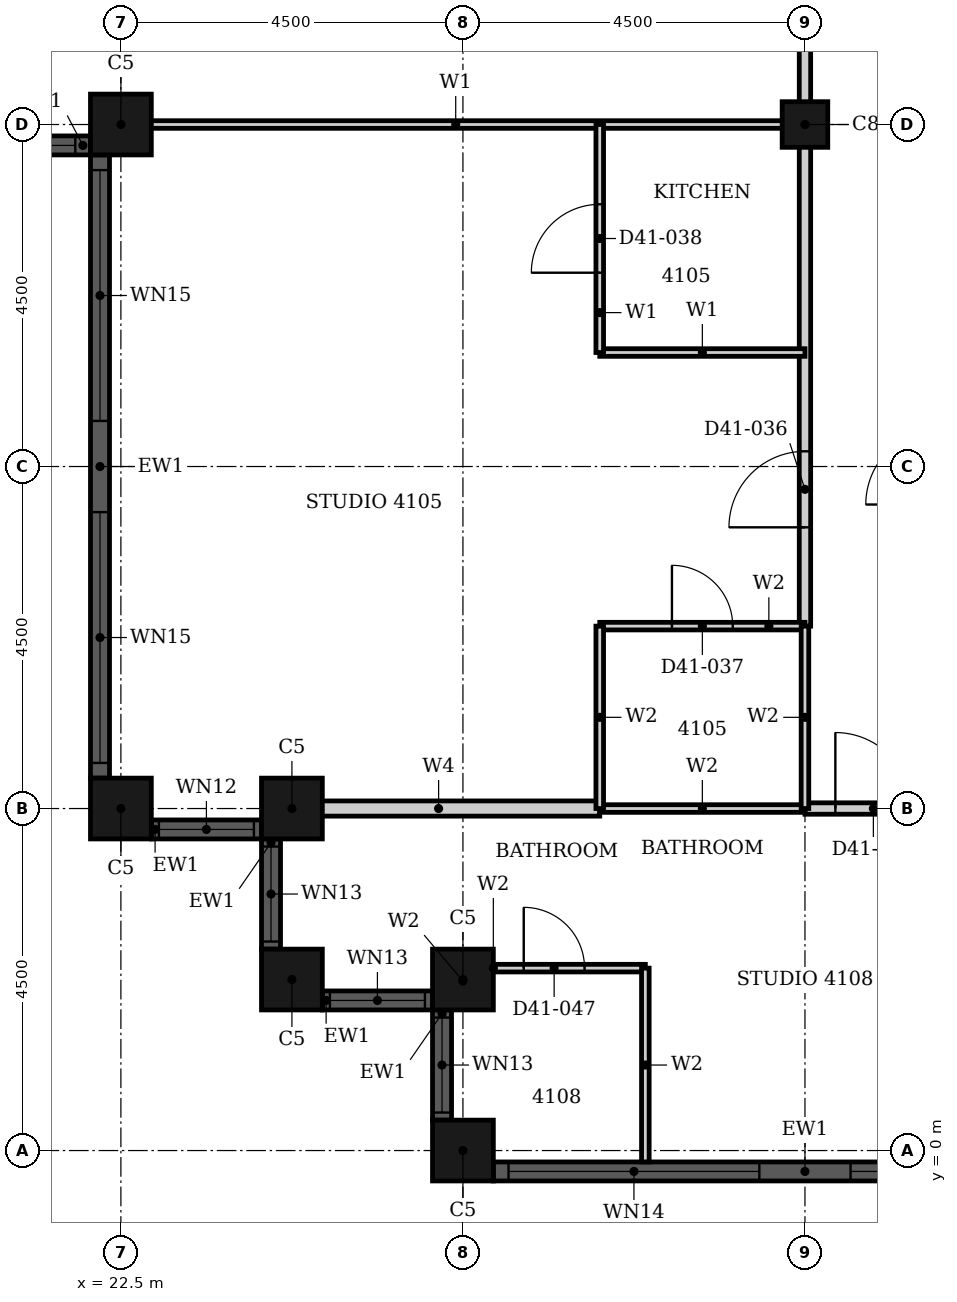
"""IFC4 building model, lengths in metres.
Left out: names, types, materials, properties, quantities, classifications, styles, units other than length and angle.
Written with IfcOpenShell. Run it as: python <this file> out.ifc"""

import sys

from ifc_helpers import new_model, si_unit, direction, frame, frame_2d, origin, origin_2d, place, context, subcontext, project, spatial, rectangle, hollow_rectangle, extrude, element, fill, save


model = new_model("IFC4")
c1 = context("Model", 3, precision=1e-05, world=origin(), true_north=direction((0.0, 1.0)))
c2 = subcontext(c1, "Body", "Model", "MODEL_VIEW")
j1 = project(units=[si_unit("LENGTHUNIT", "METRE"), si_unit("PLANEANGLEUNIT", "RADIAN")], contexts=[c1])
p1 = place(None, origin())
s1 = spatial("IfcSite", under=j1, at=p1, CompositionType="ELEMENT")
p2 = place(p1, origin())
s2 = spatial("IfcBuilding", under=s1, at=p2, CompositionType="ELEMENT")
p3 = place(p2, frame((0.0, 0.0, 165.4)))
s3 = spatial("IfcBuildingStorey", under=s2, at=p3, CompositionType="ELEMENT", Elevation=165.4)
for number, where, z_axis, x_axis in (
    (1, (22.5, 4.5, 0.0), (0.0, 0.0, 1.0), (1.0, 0.0, 0.0)),
    (2, (24.75, 4.5, 0.0), (0.0, 0.0, 1.0), (1.0, 0.0, 0.0)),
    (3, (24.75, 2.25, 0.0), (0.0, 0.0, 1.0), (1.0, 0.0, 0.0)),
    (4, (27.0, 2.25, 0.0), (0.0, 0.0, 1.0), (1.0, 0.0, 0.0)),
    (5, (27.0, 0.0, 0.0), (0.0, 0.0, 1.0), (1.0, 0.0, 0.0)),
    (6, (22.5, 13.5, 0.0), (0.0, 0.0, 1.0), (1.0, 0.0, 0.0)),
):
    element("IfcColumn", number, at=place(p3, frame(where, z_axis=z_axis, x_axis=x_axis)), inside=s3, PredefinedType="COLUMN", context=c2, shape_type="SweptSolid", body=[
        extrude(hollow_rectangle(XDim=0.8, YDim=0.8, WallThickness=0.025, at=origin_2d()), origin(), (0.0, 0.0, 1.0), 3.7),
    ])
p4 = place(p3, frame((31.5, 13.5, 0.0), z_axis=(0.0, 0.0, 1.0), x_axis=(1.0, 0.0, 0.0)))
e7 = element("IfcColumn", 7, at=p4, inside=s3, PredefinedType="COLUMN", context=c2, shape_type="SweptSolid", body=[
    extrude(hollow_rectangle(XDim=0.6, YDim=0.6, WallThickness=0.02, at=origin_2d()), origin(), (0.0, 0.0, 1.0), 3.7),
])
p5 = place(p3, frame((22.9, 4.225, 0.0), z_axis=(0.0, 0.0, 1.0), x_axis=(1.0, 0.0, 0.0)))
e8 = element("IfcWall", 8, at=p5, inside=s3, PredefinedType="SOLIDWALL", context=c2, shape_type="SweptSolid", body=[
    extrude(rectangle(XDim=1.45, YDim=0.25, at=frame_2d((0.725, 0.0))), origin(), (0.0, 0.0, 1.0), 3.7),
])
p6 = place(p5, frame((0.1, 0.0, 0.9)))
e9 = element("IfcOpeningElement", 9, at=p6, cuts=e8, PredefinedType="OPENING", context=c2, shape_type="SweptSolid", body=[
    extrude(rectangle(XDim=1.25, YDim=2.08, at=frame_2d((0.625, 1.04))), frame((0.0, 0.135, 0.0), z_axis=(0.0, -1.0, 0.0), x_axis=(1.0, 0.0, 0.0)), (0.0, 0.0, 1.0), 0.27),
])
p7 = place(p3, frame((24.475, 4.1, 0.0), z_axis=(0.0, 0.0, 1.0), x_axis=(0.0, -1.0, 0.0)))
e10 = element("IfcWall", 10, at=p7, inside=s3, PredefinedType="SOLIDWALL", context=c2, shape_type="SweptSolid", body=[
    extrude(rectangle(XDim=1.45, YDim=0.25, at=frame_2d((0.725, 0.0))), origin(), (0.0, 0.0, 1.0), 3.7),
])
p8 = place(p7, frame((0.1, 0.0, 0.9)))
e11 = element("IfcOpeningElement", 11, at=p8, cuts=e10, PredefinedType="OPENING", context=c2, shape_type="SweptSolid", body=[
    extrude(rectangle(XDim=1.25, YDim=1.85, at=frame_2d((0.625, 0.925))), frame((0.0, 0.135, 0.0), z_axis=(0.0, -1.0, 0.0), x_axis=(1.0, 0.0, 0.0)), (0.0, 0.0, 1.0), 0.27),
])
p9 = place(p3, frame((25.15, 1.975, 0.0), z_axis=(0.0, 0.0, 1.0), x_axis=(1.0, 0.0, 0.0)))
e12 = element("IfcWall", 12, at=p9, inside=s3, PredefinedType="SOLIDWALL", context=c2, shape_type="SweptSolid", body=[
    extrude(rectangle(XDim=1.45, YDim=0.25, at=frame_2d((0.725, 0.0))), origin(), (0.0, 0.0, 1.0), 3.7),
])
p10 = place(p9, frame((0.1, 0.0, 0.9)))
e13 = element("IfcOpeningElement", 13, at=p10, cuts=e12, PredefinedType="OPENING", context=c2, shape_type="SweptSolid", body=[
    extrude(rectangle(XDim=1.25, YDim=1.85, at=frame_2d((0.625, 0.925))), frame((0.0, 0.135, 0.0), z_axis=(0.0, -1.0, 0.0), x_axis=(1.0, 0.0, 0.0)), (0.0, 0.0, 1.0), 0.27),
])
p11 = place(p3, frame((26.725, 1.85, 0.0), z_axis=(0.0, 0.0, 1.0), x_axis=(0.0, -1.0, 0.0)))
e14 = element("IfcWall", 14, at=p11, inside=s3, PredefinedType="SOLIDWALL", context=c2, shape_type="SweptSolid", body=[
    extrude(rectangle(XDim=1.45, YDim=0.25, at=frame_2d((0.725, 0.0))), origin(), (0.0, 0.0, 1.0), 3.7),
])
p12 = place(p11, frame((0.1, 0.0, 0.9)))
e15 = element("IfcOpeningElement", 15, at=p12, cuts=e14, PredefinedType="OPENING", context=c2, shape_type="SweptSolid", body=[
    extrude(rectangle(XDim=1.25, YDim=1.85, at=frame_2d((0.625, 0.925))), frame((0.0, 0.135, 0.0), z_axis=(0.0, -1.0, 0.0), x_axis=(1.0, 0.0, 0.0)), (0.0, 0.0, 1.0), 0.27),
])
p13 = place(p3, frame((27.4, -0.275, 0.0), z_axis=(0.0, 0.0, 1.0), x_axis=(1.0, 0.0, 0.0)))
e16 = element("IfcWall", 16, at=p13, inside=s3, PredefinedType="SOLIDWALL", context=c2, shape_type="SweptSolid", body=[
    extrude(rectangle(XDim=8.2, YDim=0.25, at=frame_2d((4.1, 0.0))), origin(), (0.0, 0.0, 1.0), 3.7),
])
p14 = place(p13, frame((0.2, 0.0, 0.45)))
e17 = element("IfcOpeningElement", 17, at=p14, cuts=e16, PredefinedType="OPENING", context=c2, shape_type="SweptSolid", body=[
    extrude(rectangle(XDim=3.3, YDim=2.53, at=frame_2d((1.65, 1.265))), frame((0.0, 0.135, 0.0), z_axis=(0.0, -1.0, 0.0), x_axis=(1.0, 0.0, 0.0)), (0.0, 0.0, 1.0), 0.27),
])
p15 = place(p13, frame((4.7, 0.0, 0.45)))
e18 = element("IfcOpeningElement", 18, at=p15, cuts=e16, PredefinedType="OPENING", context=c2, shape_type="SweptSolid", body=[
    extrude(rectangle(XDim=3.3, YDim=2.53, at=frame_2d((1.65, 1.265))), frame((0.0, 0.135, 0.0), z_axis=(0.0, -1.0, 0.0), x_axis=(1.0, 0.0, 0.0)), (0.0, 0.0, 1.0), 0.27),
])
p16 = place(p3, frame((18.4, 13.225, 0.0), z_axis=(0.0, 0.0, 1.0), x_axis=(1.0, 0.0, 0.0)))
e19 = element("IfcWall", 19, at=p16, inside=s3, PredefinedType="SOLIDWALL", context=c2, shape_type="SweptSolid", body=[
    extrude(rectangle(XDim=3.7, YDim=0.25, at=frame_2d((1.85, 0.0))), origin(), (0.0, 0.0, 1.0), 3.7),
])
p17 = place(p16, frame((0.2, 0.0, 0.45)))
e20 = element("IfcOpeningElement", 20, at=p17, cuts=e19, PredefinedType="OPENING", context=c2, shape_type="SweptSolid", body=[
    extrude(rectangle(XDim=3.3, YDim=2.3, at=frame_2d((1.65, 1.15))), frame((0.0, 0.135, 0.0), z_axis=(0.0, -1.0, 0.0), x_axis=(1.0, 0.0, 0.0)), (0.0, 0.0, 1.0), 0.27),
])
p18 = place(p3, frame((22.225, 13.1, 0.0), z_axis=(0.0, 0.0, 1.0), x_axis=(0.0, -1.0, 0.0)))
e21 = element("IfcWall", 21, at=p18, inside=s3, PredefinedType="SOLIDWALL", context=c2, shape_type="SweptSolid", body=[
    extrude(rectangle(XDim=8.2, YDim=0.25, at=frame_2d((4.1, 0.0))), origin(), (0.0, 0.0, 1.0), 3.7),
])
p19 = place(p18, frame((0.2, 0.0, 0.45)))
e22 = element("IfcOpeningElement", 22, at=p19, cuts=e21, PredefinedType="OPENING", context=c2, shape_type="SweptSolid", body=[
    extrude(rectangle(XDim=3.3, YDim=2.3, at=frame_2d((1.65, 1.15))), frame((0.0, 0.135, 0.0), z_axis=(0.0, -1.0, 0.0), x_axis=(1.0, 0.0, 0.0)), (0.0, 0.0, 1.0), 0.27),
])
p20 = place(p18, frame((4.7, 0.0, 0.45)))
e23 = element("IfcOpeningElement", 23, at=p20, cuts=e21, PredefinedType="OPENING", context=c2, shape_type="SweptSolid", body=[
    extrude(rectangle(XDim=3.3, YDim=2.3, at=frame_2d((1.65, 1.15))), frame((0.0, 0.135, 0.0), z_axis=(0.0, -1.0, 0.0), x_axis=(1.0, 0.0, 0.0)), (0.0, 0.0, 1.0), 0.27),
])
p21 = place(p3, frame((31.5, 4.5, 0.0), z_axis=(0.0, 0.0, 1.0), x_axis=(1.0, 0.0, 0.0)))
e24 = element("IfcWall", 24, at=p21, inside=s3, PredefinedType="PARTITIONING", context=c2, shape_type="SweptSolid", body=[
    extrude(rectangle(XDim=1.8, YDim=0.15, at=frame_2d((0.9, 0.0))), origin(), (0.0, 0.0, 1.0), 3.4),
])
p22 = place(p21, frame((0.4, 0.0, 0.0)))
e25 = element("IfcOpeningElement", 25, at=p22, cuts=e24, PredefinedType="OPENING", context=c2, shape_type="SweptSolid", body=[
    extrude(rectangle(XDim=1.0, YDim=2.2, at=frame_2d((0.5, 1.1))), frame((0.0, 0.085, 0.0), z_axis=(0.0, -1.0, 0.0), x_axis=(1.0, 0.0, 0.0)), (0.0, 0.0, 1.0), 0.17),
])
p23 = place(p3, frame((31.5, 6.9, 0.0), z_axis=(0.0, 0.0, 1.0), x_axis=(0.0, 1.0, 0.0)))
e26 = element("IfcWall", 26, at=p23, inside=s3, PredefinedType="PARTITIONING", context=c2, shape_type="SweptSolid", body=[
    extrude(rectangle(XDim=13.8, YDim=0.15, at=frame_2d((6.9, 0.0))), origin(), (0.0, 0.0, 1.0), 2.68),
])
p24 = place(p23, frame((1.3, 0.0, 0.0)))
e27 = element("IfcOpeningElement", 27, at=p24, cuts=e26, PredefinedType="OPENING", context=c2, shape_type="SweptSolid", body=[
    extrude(rectangle(XDim=1.0, YDim=2.2, at=frame_2d((0.5, 1.1))), frame((0.0, 0.085, 0.0), z_axis=(0.0, -1.0, 0.0), x_axis=(1.0, 0.0, 0.0)), (0.0, 0.0, 1.0), 0.17),
])
p25 = place(p3, frame((28.8, 10.5, 0.0), z_axis=(0.0, 0.0, 1.0), x_axis=(1.0, 0.0, 0.0)))
e28 = element("IfcWall", 28, at=p25, inside=s3, PredefinedType="PARTITIONING", context=c2, shape_type="SweptSolid", body=[
    extrude(rectangle(XDim=2.7, YDim=0.1, at=frame_2d((1.35, 0.0))), origin(), (0.0, 0.0, 1.0), 3.4),
])
p26 = place(p3, frame((22.31, 13.5, 0.0), z_axis=(0.0, 0.0, 1.0), x_axis=(1.0, 0.0, 0.0)))
e29 = element("IfcWall", 29, at=p26, inside=s3, PredefinedType="PARTITIONING", context=c2, shape_type="SweptSolid", body=[
    extrude(rectangle(XDim=9.19, YDim=0.1, at=frame_2d((4.595, 0.0))), origin(), (0.0, 0.0, 1.0), 2.48),
])
p27 = place(p3, frame((28.8, 10.5, 0.0), z_axis=(0.0, 0.0, 1.0), x_axis=(0.0, 1.0, 0.0)))
e30 = element("IfcWall", 30, at=p27, inside=s3, PredefinedType="PARTITIONING", context=c2, shape_type="SweptSolid", body=[
    extrude(rectangle(XDim=3.0, YDim=0.1, at=frame_2d((1.5, 0.0))), origin(), (0.0, 0.0, 1.0), 3.4),
])
p28 = place(p27, frame((1.05, 0.0, 0.0)))
e31 = element("IfcOpeningElement", 31, at=p28, cuts=e30, PredefinedType="OPENING", context=c2, shape_type="SweptSolid", body=[
    extrude(rectangle(XDim=0.9, YDim=2.1, at=frame_2d((0.45, 1.05))), frame((0.0, 0.06, 0.0), z_axis=(0.0, -1.0, 0.0), x_axis=(1.0, 0.0, 0.0)), (0.0, 0.0, 1.0), 0.12),
])
p29 = place(p3, frame((24.56, 4.5, 0.0), z_axis=(0.0, 0.0, 1.0), x_axis=(1.0, 0.0, 0.0)))
e32 = element("IfcWall", 32, at=p29, inside=s3, PredefinedType="PARTITIONING", context=c2, shape_type="SweptSolid", body=[
    extrude(rectangle(XDim=4.24, YDim=0.2, at=frame_2d((2.12, 0.0))), origin(), (0.0, 0.0, 1.0), 3.4),
])
p30 = place(p3, frame((27.0, 2.4, 0.0), z_axis=(0.0, 0.0, 1.0), x_axis=(1.0, 0.0, 0.0)))
e33 = element("IfcWall", 33, at=p30, inside=s3, PredefinedType="PARTITIONING", context=c2, shape_type="SweptSolid", body=[
    extrude(rectangle(XDim=2.4, YDim=0.1, at=frame_2d((1.2, 0.0))), origin(), (0.0, 0.0, 1.0), 3.4),
])
p31 = place(p30, frame((0.8, 0.0, 0.0)))
e34 = element("IfcOpeningElement", 34, at=p31, cuts=e33, PredefinedType="OPENING", context=c2, shape_type="SweptSolid", body=[
    extrude(rectangle(XDim=0.8, YDim=2.1, at=frame_2d((0.4, 1.05))), frame((0.0, 0.06, 0.0), z_axis=(0.0, -1.0, 0.0), x_axis=(1.0, 0.0, 0.0)), (0.0, 0.0, 1.0), 0.12),
])
p32 = place(p3, frame((28.8, 4.5, 0.0), z_axis=(0.0, 0.0, 1.0), x_axis=(1.0, 0.0, 0.0)))
e35 = element("IfcWall", 35, at=p32, inside=s3, PredefinedType="PARTITIONING", context=c2, shape_type="SweptSolid", body=[
    extrude(rectangle(XDim=2.7, YDim=0.1, at=frame_2d((1.35, 0.0))), origin(), (0.0, 0.0, 1.0), 3.4),
])
p33 = place(p3, frame((28.8, 6.9, 0.0), z_axis=(0.0, 0.0, 1.0), x_axis=(1.0, 0.0, 0.0)))
e36 = element("IfcWall", 36, at=p33, inside=s3, PredefinedType="PARTITIONING", context=c2, shape_type="SweptSolid", body=[
    extrude(rectangle(XDim=2.7, YDim=0.1, at=frame_2d((1.35, 0.0))), origin(), (0.0, 0.0, 1.0), 3.4),
])
p34 = place(p33, frame((0.95, 0.0, 0.0)))
e37 = element("IfcOpeningElement", 37, at=p34, cuts=e36, PredefinedType="OPENING", context=c2, shape_type="SweptSolid", body=[
    extrude(rectangle(XDim=0.8, YDim=2.1, at=frame_2d((0.4, 1.05))), frame((0.0, 0.06, 0.0), z_axis=(0.0, -1.0, 0.0), x_axis=(1.0, 0.0, 0.0)), (0.0, 0.0, 1.0), 0.12),
])
p35 = place(p3, frame((27.0, 2.06, 0.0), z_axis=(0.0, 0.0, 1.0), x_axis=(0.0, 1.0, 0.0)))
e38 = element("IfcWall", 38, at=p35, inside=s3, PredefinedType="PARTITIONING", context=c2, shape_type="SweptSolid", body=[
    extrude(rectangle(XDim=0.34, YDim=0.1, at=frame_2d((0.17, 0.0))), origin(), (0.0, 0.0, 1.0), 3.4),
])
p36 = place(p3, frame((28.8, 4.5, 0.0), z_axis=(0.0, 0.0, 1.0), x_axis=(0.0, 1.0, 0.0)))
e39 = element("IfcWall", 39, at=p36, inside=s3, PredefinedType="PARTITIONING", context=c2, shape_type="SweptSolid", body=[
    extrude(rectangle(XDim=2.4, YDim=0.1, at=frame_2d((1.2, 0.0))), origin(), (0.0, 0.0, 1.0), 3.4),
])
p37 = place(p3, frame((29.4, -0.15, 0.0), z_axis=(0.0, 0.0, 1.0), x_axis=(0.0, 1.0, 0.0)))
e40 = element("IfcWall", 40, at=p37, inside=s3, PredefinedType="PARTITIONING", context=c2, shape_type="SweptSolid", body=[
    extrude(rectangle(XDim=2.55, YDim=0.1, at=frame_2d((1.275, 0.0))), origin(), (0.0, 0.0, 1.0), 3.4),
])
p38 = place(p3, frame((31.5, 4.5, 0.0), z_axis=(0.0, 0.0, 1.0), x_axis=(0.0, 1.0, 0.0)))
e41 = element("IfcWall", 41, at=p38, inside=s3, PredefinedType="PARTITIONING", context=c2, shape_type="SweptSolid", body=[
    extrude(rectangle(XDim=2.4, YDim=0.1, at=frame_2d((1.2, 0.0))), origin(), (0.0, 0.0, 1.0), 2.68),
])
p39 = place(p6, origin())
e42 = element("IfcWindow", 42, at=p39, inside=s3, PartitioningType="SINGLE_PANEL", PredefinedType="WINDOW", context=c2, shape_type="SweptSolid", body=[
    extrude(rectangle(XDim=1.25, YDim=2.08, at=frame_2d((0.625, 1.04))), frame((0.0, 0.03, 0.0), z_axis=(0.0, -1.0, 0.0), x_axis=(1.0, 0.0, 0.0)), (0.0, 0.0, 1.0), 0.06),
])
fill(e9, e42)
p40 = place(p8, origin())
e43 = element("IfcWindow", 43, at=p40, inside=s3, PartitioningType="SINGLE_PANEL", PredefinedType="WINDOW", context=c2, shape_type="SweptSolid", body=[
    extrude(rectangle(XDim=1.25, YDim=1.85, at=frame_2d((0.625, 0.925))), frame((0.0, 0.03, 0.0), z_axis=(0.0, -1.0, 0.0), x_axis=(1.0, 0.0, 0.0)), (0.0, 0.0, 1.0), 0.06),
])
fill(e11, e43)
p41 = place(p10, origin())
e44 = element("IfcWindow", 44, at=p41, inside=s3, PartitioningType="SINGLE_PANEL", PredefinedType="WINDOW", context=c2, shape_type="SweptSolid", body=[
    extrude(rectangle(XDim=1.25, YDim=1.85, at=frame_2d((0.625, 0.925))), frame((0.0, 0.03, 0.0), z_axis=(0.0, -1.0, 0.0), x_axis=(1.0, 0.0, 0.0)), (0.0, 0.0, 1.0), 0.06),
])
fill(e13, e44)
p42 = place(p12, origin())
e45 = element("IfcWindow", 45, at=p42, inside=s3, PartitioningType="SINGLE_PANEL", PredefinedType="WINDOW", context=c2, shape_type="SweptSolid", body=[
    extrude(rectangle(XDim=1.25, YDim=1.85, at=frame_2d((0.625, 0.925))), frame((0.0, 0.03, 0.0), z_axis=(0.0, -1.0, 0.0), x_axis=(1.0, 0.0, 0.0)), (0.0, 0.0, 1.0), 0.06),
])
fill(e15, e45)
p43 = place(p14, origin())
e46 = element("IfcWindow", 46, at=p43, inside=s3, PartitioningType="SINGLE_PANEL", PredefinedType="WINDOW", context=c2, shape_type="SweptSolid", body=[
    extrude(rectangle(XDim=3.3, YDim=2.53, at=frame_2d((1.65, 1.265))), frame((0.0, 0.03, 0.0), z_axis=(0.0, -1.0, 0.0), x_axis=(1.0, 0.0, 0.0)), (0.0, 0.0, 1.0), 0.06),
])
fill(e17, e46)
p44 = place(p15, origin())
e47 = element("IfcWindow", 47, at=p44, inside=s3, PartitioningType="SINGLE_PANEL", PredefinedType="WINDOW", context=c2, shape_type="SweptSolid", body=[
    extrude(rectangle(XDim=3.3, YDim=2.53, at=frame_2d((1.65, 1.265))), frame((0.0, 0.03, 0.0), z_axis=(0.0, -1.0, 0.0), x_axis=(1.0, 0.0, 0.0)), (0.0, 0.0, 1.0), 0.06),
])
fill(e18, e47)
p45 = place(p17, origin())
e48 = element("IfcWindow", 48, at=p45, inside=s3, PartitioningType="SINGLE_PANEL", PredefinedType="WINDOW", context=c2, shape_type="SweptSolid", body=[
    extrude(rectangle(XDim=3.3, YDim=2.3, at=frame_2d((1.65, 1.15))), frame((0.0, 0.03, 0.0), z_axis=(0.0, -1.0, 0.0), x_axis=(1.0, 0.0, 0.0)), (0.0, 0.0, 1.0), 0.06),
])
fill(e20, e48)
p46 = place(p19, origin())
e49 = element("IfcWindow", 49, at=p46, inside=s3, PartitioningType="SINGLE_PANEL", PredefinedType="WINDOW", context=c2, shape_type="SweptSolid", body=[
    extrude(rectangle(XDim=3.3, YDim=2.3, at=frame_2d((1.65, 1.15))), frame((0.0, 0.03, 0.0), z_axis=(0.0, -1.0, 0.0), x_axis=(1.0, 0.0, 0.0)), (0.0, 0.0, 1.0), 0.06),
])
fill(e22, e49)
p47 = place(p20, origin())
e50 = element("IfcWindow", 50, at=p47, inside=s3, PartitioningType="SINGLE_PANEL", PredefinedType="WINDOW", context=c2, shape_type="SweptSolid", body=[
    extrude(rectangle(XDim=3.3, YDim=2.3, at=frame_2d((1.65, 1.15))), frame((0.0, 0.03, 0.0), z_axis=(0.0, -1.0, 0.0), x_axis=(1.0, 0.0, 0.0)), (0.0, 0.0, 1.0), 0.06),
])
fill(e23, e50)
p48 = place(p24, origin())
e51 = element("IfcDoor", 51, at=p48, inside=s3, OperationType="SINGLE_SWING_RIGHT", PredefinedType="DOOR", context=c2, shape_type="SweptSolid", body=[
    extrude(rectangle(XDim=1.0, YDim=2.2, at=frame_2d((0.5, 1.1))), frame((0.0, 0.025, 0.0), z_axis=(0.0, -1.0, 0.0), x_axis=(1.0, 0.0, 0.0)), (0.0, 0.0, 1.0), 0.05),
])
fill(e27, e51)
p49 = place(p34, origin())
e52 = element("IfcDoor", 52, at=p49, inside=s3, OperationType="SINGLE_SWING_RIGHT", PredefinedType="DOOR", context=c2, shape_type="SweptSolid", body=[
    extrude(rectangle(XDim=0.8, YDim=2.1, at=frame_2d((0.4, 1.05))), frame((0.0, 0.025, 0.0), z_axis=(0.0, -1.0, 0.0), x_axis=(1.0, 0.0, 0.0)), (0.0, 0.0, 1.0), 0.05),
])
fill(e37, e52)
p50 = place(p28, origin())
e53 = element("IfcDoor", 53, at=p50, inside=s3, OperationType="SINGLE_SWING_RIGHT", PredefinedType="DOOR", context=c2, shape_type="SweptSolid", body=[
    extrude(rectangle(XDim=0.9, YDim=2.1, at=frame_2d((0.45, 1.05))), frame((0.0, 0.025, 0.0), z_axis=(0.0, -1.0, 0.0), x_axis=(1.0, 0.0, 0.0)), (0.0, 0.0, 1.0), 0.05),
])
fill(e31, e53)
p51 = place(p22, origin())
e54 = element("IfcDoor", 54, at=p51, inside=s3, OperationType="SINGLE_SWING_LEFT", PredefinedType="DOOR", context=c2, shape_type="SweptSolid", body=[
    extrude(rectangle(XDim=1.0, YDim=2.2, at=frame_2d((0.5, 1.1))), frame((0.0, 0.025, 0.0), z_axis=(0.0, -1.0, 0.0), x_axis=(1.0, 0.0, 0.0)), (0.0, 0.0, 1.0), 0.05),
])
fill(e25, e54)
p52 = place(p31, origin())
e55 = element("IfcDoor", 55, at=p52, inside=s3, OperationType="SINGLE_SWING_RIGHT", PredefinedType="DOOR", context=c2, shape_type="SweptSolid", body=[
    extrude(rectangle(XDim=0.8, YDim=2.1, at=frame_2d((0.4, 1.05))), frame((0.0, 0.025, 0.0), z_axis=(0.0, -1.0, 0.0), x_axis=(1.0, 0.0, 0.0)), (0.0, 0.0, 1.0), 0.05),
])
fill(e34, e55)
save(model, sys.argv[1])
